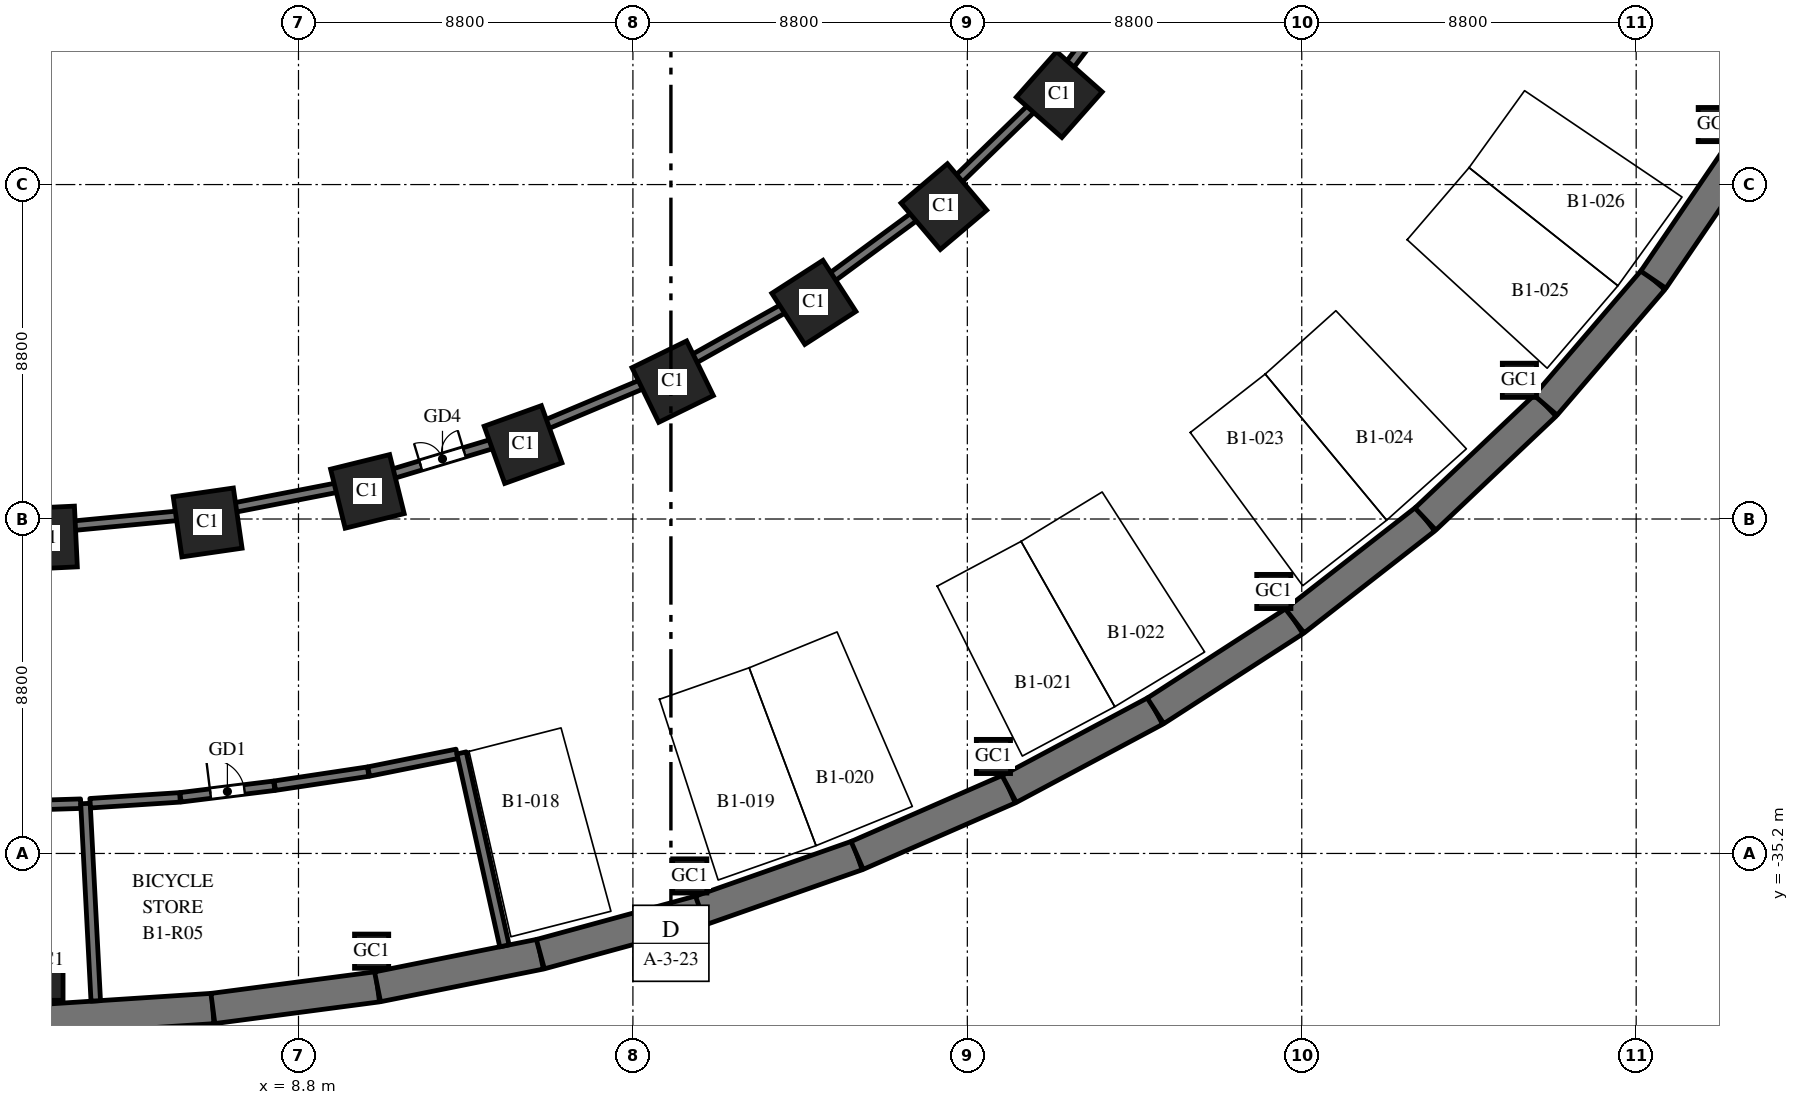
"""IFC4 building model, lengths in metres.
Left out: names, types, materials, properties, quantities, classifications, styles, units other than length and angle.
Written with IfcOpenShell. Run it as: python <this file> out.ifc"""

import sys

from ifc_helpers import new_model, si_unit, direction, frame, frame_2d, origin, origin_2d, place, context, subcontext, project, spatial, rectangle, hollow_rectangle, extrude, element, fill, save


model = new_model("IFC4")
c1 = context("Model", 3, precision=1e-05, world=origin(), true_north=direction((0.0, 1.0)))
c2 = subcontext(c1, "Body", "Model", "MODEL_VIEW")
j1 = project(units=[si_unit("LENGTHUNIT", "METRE"), si_unit("PLANEANGLEUNIT", "RADIAN")], contexts=[c1])
p1 = place(None, origin())
s1 = spatial("IfcSite", under=j1, at=p1, CompositionType="ELEMENT")
p2 = place(p1, origin())
s2 = spatial("IfcBuilding", under=s1, at=p2, CompositionType="ELEMENT")
p3 = place(p2, frame((0.0, 0.0, -4.2)))
s3 = spatial("IfcBuildingStorey", under=s2, at=p3, CompositionType="ELEMENT", Elevation=-4.2)
p4 = place(p3, frame((2.186, -39.564, 0.0), z_axis=(0.0, 0.0, 1.0), x_axis=(0.997876871627, 0.065128711577, 0.0)))
e1 = element("IfcWall", 1, at=p4, inside=s3, PredefinedType="SOLIDWALL", context=c2, shape_type="SweptSolid", body=[
    extrude(rectangle(XDim=4.371, YDim=0.8, at=frame_2d((2.186, 0.0))), origin(), (0.0, 0.0, 1.0), 3.85),
])
p5 = place(p3, frame((6.547, -39.28, 0.0), z_axis=(0.0, 0.0, 1.0), x_axis=(0.991441741932, 0.130549884544, 0.0)))
e2 = element("IfcWall", 2, at=p5, inside=s3, PredefinedType="SOLIDWALL", context=c2, shape_type="SweptSolid", body=[
    extrude(rectangle(XDim=4.37, YDim=0.8, at=frame_2d((2.185, 0.0))), origin(), (0.0, 0.0, 1.0), 3.85),
])
p6 = place(p3, frame((10.88, -38.709, 0.0), z_axis=(0.0, 0.0, 1.0), x_axis=(0.980494629762, 0.196545875071, 0.0)))
e3 = element("IfcWall", 3, at=p6, inside=s3, PredefinedType="SOLIDWALL", context=c2, shape_type="SweptSolid", body=[
    extrude(rectangle(XDim=4.37, YDim=0.8, at=frame_2d((2.185, 0.0))), origin(), (0.0, 0.0, 1.0), 3.85),
])
p7 = place(p3, frame((15.165, -37.85, 0.0), z_axis=(0.0, 0.0, 1.0), x_axis=(0.964679950239, 0.263424739931, 0.0)))
e4 = element("IfcWall", 4, at=p7, inside=s3, PredefinedType="SOLIDWALL", context=c2, shape_type="SweptSolid", body=[
    extrude(rectangle(XDim=4.369, YDim=0.8, at=frame_2d((2.185, 0.0))), origin(), (0.0, 0.0, 1.0), 3.85),
])
p8 = place(p3, frame((19.379, -36.699, 0.0), z_axis=(0.0, 0.0, 1.0), x_axis=(0.943526738033, 0.331296384853, 0.0)))
e5 = element("IfcWall", 5, at=p8, inside=s3, PredefinedType="SOLIDWALL", context=c2, shape_type="SweptSolid", body=[
    extrude(rectangle(XDim=4.368, YDim=0.8, at=frame_2d((2.184, 0.0))), origin(), (0.0, 0.0, 1.0), 3.85),
])
p9 = place(p3, frame((23.5, -35.252, 0.0), z_axis=(0.0, 0.0, 1.0), x_axis=(0.916336904548, 0.400408138483, 0.0)))
e6 = element("IfcWall", 6, at=p9, inside=s3, PredefinedType="SOLIDWALL", context=c2, shape_type="SweptSolid", body=[
    extrude(rectangle(XDim=4.366, YDim=0.8, at=frame_2d((2.183, 0.0))), origin(), (0.0, 0.0, 1.0), 3.85),
])
p10 = place(p3, frame((27.501, -33.504, 0.0), z_axis=(0.0, 0.0, 1.0), x_axis=(0.882159305704, 0.47095112205, 0.0)))
e7 = element("IfcWall", 7, at=p10, inside=s3, PredefinedType="SOLIDWALL", context=c2, shape_type="SweptSolid", body=[
    extrude(rectangle(XDim=4.365, YDim=0.8, at=frame_2d((2.182, 0.0))), origin(), (0.0, 0.0, 1.0), 3.85),
])
p11 = place(p3, frame((31.352, -31.448, 0.0), z_axis=(0.0, 0.0, 1.0), x_axis=(0.840047348843, 0.542513088969, 0.0)))
e8 = element("IfcWall", 8, at=p11, inside=s3, PredefinedType="SOLIDWALL", context=c2, shape_type="SweptSolid", body=[
    extrude(rectangle(XDim=4.362, YDim=0.8, at=frame_2d((2.181, 0.0))), origin(), (0.0, 0.0, 1.0), 3.85),
])
p12 = place(p3, frame((35.016, -29.082, 0.0), z_axis=(0.0, 0.0, 1.0), x_axis=(0.788491985196, 0.615045030288, 0.0)))
e9 = element("IfcWall", 9, at=p12, inside=s3, PredefinedType="SOLIDWALL", context=c2, shape_type="SweptSolid", body=[
    extrude(rectangle(XDim=4.359, YDim=0.8, at=frame_2d((2.18, 0.0))), origin(), (0.0, 0.0, 1.0), 3.85),
])
p13 = place(p3, frame((38.453, -26.401, 0.0), z_axis=(0.0, 0.0, 1.0), x_axis=(0.72620446032, 0.687478786444, 0.0)))
e10 = element("IfcWall", 10, at=p13, inside=s3, PredefinedType="SOLIDWALL", context=c2, shape_type="SweptSolid", body=[
    extrude(rectangle(XDim=4.356, YDim=0.8, at=frame_2d((2.178, 0.0))), origin(), (0.0, 0.0, 1.0), 3.85),
])
p14 = place(p3, frame((41.617, -23.406, 0.0), z_axis=(0.0, 0.0, 1.0), x_axis=(0.651387059497, 0.758745608699, 0.0)))
e11 = element("IfcWall", 11, at=p14, inside=s3, PredefinedType="SOLIDWALL", context=c2, shape_type="SweptSolid", body=[
    extrude(rectangle(XDim=4.353, YDim=0.8, at=frame_2d((2.176, 0.0))), origin(), (0.0, 0.0, 1.0), 3.85),
])
p15 = place(p3, frame((44.452, -20.104, 0.0), z_axis=(0.0, 0.0, 1.0), x_axis=(0.562667738859, 0.82668314102, 0.0)))
e12 = element("IfcWall", 12, at=p15, inside=s3, PredefinedType="SOLIDWALL", context=c2, shape_type="SweptSolid", body=[
    extrude(rectangle(XDim=4.349, YDim=0.8, at=frame_2d((2.174, 0.0))), origin(), (0.0, 0.0, 1.0), 3.85),
])
for number, where, z_axis, x_axis in (
    (13, (2.143, -26.898, 0.0), (0.0, 0.0, 1.0), (0.999, 0.048, 0.0)),
    (14, (6.409, -26.491, 0.0), (0.0, 0.0, 1.0), (0.99, 0.143, 0.0)),
    (15, (10.613, -25.674, 0.0), (0.0, 0.0, 1.0), (0.971, 0.24, 0.0)),
    (16, (14.709, -24.441, 0.0), (0.0, 0.0, 1.0), (0.941, 0.338, 0.0)),
    (17, (18.646, -22.785, 0.0), (0.0, 0.0, 1.0), (0.898, 0.439, 0.0)),
    (18, (22.362, -20.7, 0.0), (0.0, 0.0, 1.0), (0.84, 0.542, 0.0)),
    (19, (25.783, -18.18, 0.0), (0.0, 0.0, 1.0), (0.763, 0.646, 0.0)),
    (20, (28.819, -15.23, 0.0), (0.0, 0.0, 1.0), (0.663, 0.749, 0.0)),
):
    element("IfcColumn", number, at=place(p3, frame(where, z_axis=z_axis, x_axis=x_axis)), inside=s3, PredefinedType="COLUMN", context=c2, shape_type="SweptSolid", body=[
        extrude(rectangle(XDim=1.6, YDim=1.6, at=origin_2d()), origin(), (0.0, 0.0, 1.0), 4.2),
    ])
for number, where, z_axis, x_axis in (
    (21, (2.155, -38.614, 0.0), (0.0, 0.0, 1.0), (1.0, 0.0, 0.0)),
    (22, (10.725, -37.771, 0.0), (0.0, 0.0, 1.0), (1.0, 0.0, 0.0)),
    (23, (19.097, -35.792, 0.0), (0.0, 0.0, 1.0), (1.0, 0.0, 0.0)),
    (24, (27.087, -32.648, 0.0), (0.0, 0.0, 1.0), (1.0, 0.0, 0.0)),
    (25, (34.465, -28.307, 0.0), (0.0, 0.0, 1.0), (1.0, 0.0, 0.0)),
    (26, (40.928, -22.75, 0.0), (0.0, 0.0, 1.0), (1.0, 0.0, 0.0)),
    (27, (46.081, -16.021, 0.0), (0.0, 0.0, 1.0), (1.0, 0.0, 0.0)),
):
    element("IfcColumn", number, at=place(p3, frame(where, z_axis=z_axis, x_axis=x_axis)), inside=s3, PredefinedType="COLUMN", context=c2, shape_type="SweptSolid", body=[
        extrude(hollow_rectangle(XDim=0.9, YDim=0.9, WallThickness=0.045, at=origin_2d()), origin(), (0.0, 0.0, 1.0), 4.2),
    ])
p16 = place(p3, frame((0.704, -33.964, 0.0), z_axis=(0.0, 0.0, 1.0), x_axis=(0.999514588935, 0.031154237368, 0.0)))
e28 = element("IfcWall", 28, at=p16, inside=s3, PredefinedType="SOLIDWALL", context=c2, shape_type="SweptSolid", body=[
    extrude(rectangle(XDim=2.367, YDim=0.25, at=frame_2d((1.183, 0.0))), origin(), (0.0, 0.0, 1.0), 2.85),
])
p17 = place(p3, frame((3.194, -33.886, 0.0), z_axis=(0.0, 0.0, 1.0), x_axis=(0.052068437351, -0.998643518895, 0.0)))
e29 = element("IfcWall", 29, at=p17, inside=s3, PredefinedType="SOLIDWALL", context=c2, shape_type="SweptSolid", body=[
    extrude(rectangle(XDim=5.2, YDim=0.25, at=frame_2d((2.6, 0.0))), origin(), (0.0, 0.0, 1.0), 3.25),
])
p18 = place(p3, frame((3.319, -33.878, 0.0), z_axis=(0.0, 0.0, 1.0), x_axis=(0.997874570946, 0.065163952143, 0.0)))
e30 = element("IfcWall", 30, at=p18, inside=s3, PredefinedType="SOLIDWALL", context=c2, shape_type="SweptSolid", body=[
    extrude(rectangle(XDim=2.368, YDim=0.25, at=frame_2d((1.184, 0.0))), origin(), (0.0, 0.0, 1.0), 3.85),
])
p19 = place(p3, frame((5.696, -33.723, 0.0), z_axis=(0.0, 0.0, 1.0), x_axis=(0.992470098736, 0.122487154901, 0.0)))
e31 = element("IfcWall", 31, at=p19, inside=s3, PredefinedType="SOLIDWALL", context=c2, shape_type="SweptSolid", body=[
    extrude(rectangle(XDim=2.486, YDim=0.25, at=frame_2d((1.243, 0.0))), origin(), (0.0, 0.0, 1.0), 3.85),
])
p20 = place(p19, frame((0.793, 0.0, 0.0)))
e32 = element("IfcOpeningElement", 32, at=p20, cuts=e31, PredefinedType="OPENING", context=c2, shape_type="SweptSolid", body=[
    extrude(rectangle(XDim=0.9, YDim=2.1, at=frame_2d((0.45, 1.05))), frame((0.0, 0.135, 0.0), z_axis=(0.0, -1.0, 0.0), x_axis=(1.0, 0.0, 0.0)), (0.0, 0.0, 1.0), 0.27),
])
p21 = place(p3, frame((8.177, -33.417, 0.0), z_axis=(0.0, 0.0, 1.0), x_axis=(0.988860556861, 0.148844882627, 0.0)))
e33 = element("IfcWall", 33, at=p21, inside=s3, PredefinedType="SOLIDWALL", context=c2, shape_type="SweptSolid", body=[
    extrude(rectangle(XDim=2.485, YDim=0.25, at=frame_2d((1.242, 0.0))), origin(), (0.0, 0.0, 1.0), 2.85),
])
p22 = place(p3, frame((10.647, -33.044, 0.0), z_axis=(0.0, 0.0, 1.0), x_axis=(0.980501286176, 0.196512665768, 0.0)))
e34 = element("IfcWall", 34, at=p22, inside=s3, PredefinedType="SOLIDWALL", context=c2, shape_type="SweptSolid", body=[
    extrude(rectangle(XDim=2.368, YDim=0.25, at=frame_2d((1.184, 0.0))), origin(), (0.0, 0.0, 1.0), 3.85),
])
p23 = place(p3, frame((13.092, -32.554, 0.0), z_axis=(0.0, 0.0, 1.0), x_axis=(0.216865830922, -0.976201419472, 0.0)))
e35 = element("IfcWall", 35, at=p23, inside=s3, PredefinedType="SOLIDWALL", context=c2, shape_type="SweptSolid", body=[
    extrude(rectangle(XDim=5.2, YDim=0.25, at=frame_2d((2.6, 0.0))), origin(), (0.0, 0.0, 1.0), 3.25),
])
p24 = place(p3, frame((2.14, -26.647, 0.0), z_axis=(0.0, 0.0, 1.0), x_axis=(0.995473208191, 0.09504257874, 0.0)))
e36 = element("IfcWall", 36, at=p24, inside=s3, PredefinedType="SOLIDWALL", context=c2, shape_type="SweptSolid", body=[
    extrude(rectangle(XDim=4.244, YDim=0.25, at=frame_2d((2.122, 0.0))), origin(), (0.0, 0.0, 1.0), 2.95),
])
p25 = place(p3, frame((6.382, -26.241, 0.0), z_axis=(0.0, 0.0, 1.0), x_axis=(0.981622881166, 0.190831127365, 0.0)))
e37 = element("IfcWall", 37, at=p25, inside=s3, PredefinedType="SOLIDWALL", context=c2, shape_type="SweptSolid", body=[
    extrude(rectangle(XDim=4.24, YDim=0.25, at=frame_2d((2.12, 0.0))), origin(), (0.0, 0.0, 1.0), 2.95),
])
p26 = place(p3, frame((10.562, -25.428, 0.0), z_axis=(0.0, 0.0, 1.0), x_axis=(0.957589494621, 0.28813600919, 0.0)))
e38 = element("IfcWall", 38, at=p26, inside=s3, PredefinedType="SOLIDWALL", context=c2, shape_type="SweptSolid", body=[
    extrude(rectangle(XDim=4.234, YDim=0.25, at=frame_2d((2.117, 0.0))), origin(), (0.0, 0.0, 1.0), 2.95),
])
p27 = place(p26, frame((1.517, 0.0, 0.0)))
e39 = element("IfcOpeningElement", 39, at=p27, cuts=e38, PredefinedType="OPENING", context=c2, shape_type="SweptSolid", body=[
    extrude(rectangle(XDim=1.2, YDim=2.1, at=frame_2d((0.6, 1.05))), frame((0.0, 0.135, 0.0), z_axis=(0.0, -1.0, 0.0), x_axis=(1.0, 0.0, 0.0)), (0.0, 0.0, 1.0), 0.27),
])
p28 = place(p3, frame((14.633, -24.202, 0.0), z_axis=(0.0, 0.0, 1.0), x_axis=(0.921810386469, 0.387641085798, 0.0)))
e40 = element("IfcWall", 40, at=p28, inside=s3, PredefinedType="SOLIDWALL", context=c2, shape_type="SweptSolid", body=[
    extrude(rectangle(XDim=4.225, YDim=0.25, at=frame_2d((2.113, 0.0))), origin(), (0.0, 0.0, 1.0), 2.95),
])
p29 = place(p3, frame((18.544, -22.556, 0.0), z_axis=(0.0, 0.0, 1.0), x_axis=(0.872061015455, 0.489397165218, 0.0)))
e41 = element("IfcWall", 41, at=p29, inside=s3, PredefinedType="SOLIDWALL", context=c2, shape_type="SweptSolid", body=[
    extrude(rectangle(XDim=4.213, YDim=0.25, at=frame_2d((2.107, 0.0))), origin(), (0.0, 0.0, 1.0), 2.95),
])
p30 = place(p3, frame((22.233, -20.484, 0.0), z_axis=(0.0, 0.0, 1.0), x_axis=(0.805155221937, 0.593064135306, 0.0)))
e42 = element("IfcWall", 42, at=p30, inside=s3, PredefinedType="SOLIDWALL", context=c2, shape_type="SweptSolid", body=[
    extrude(rectangle(XDim=4.198, YDim=0.25, at=frame_2d((2.099, 0.0))), origin(), (0.0, 0.0, 1.0), 2.95),
])
p31 = place(p3, frame((25.627, -17.983, 0.0), z_axis=(0.0, 0.0, 1.0), x_axis=(0.717227656803, 0.696838925661, 0.0)))
e43 = element("IfcWall", 43, at=p31, inside=s3, PredefinedType="SOLIDWALL", context=c2, shape_type="SweptSolid", body=[
    extrude(rectangle(XDim=4.179, YDim=0.25, at=frame_2d((2.089, 0.0))), origin(), (0.0, 0.0, 1.0), 2.95),
])
p32 = place(p3, frame((28.636, -15.057, 0.0), z_axis=(0.0, 0.0, 1.0), x_axis=(0.604041965907, 0.796952510143, 0.0)))
e44 = element("IfcWall", 44, at=p32, inside=s3, PredefinedType="SOLIDWALL", context=c2, shape_type="SweptSolid", body=[
    extrude(rectangle(XDim=4.157, YDim=0.25, at=frame_2d((2.079, 0.0))), origin(), (0.0, 0.0, 1.0), 2.95),
])
p33 = place(p20, origin())
e45 = element("IfcDoor", 45, at=p33, inside=s3, OperationType="SINGLE_SWING_LEFT", PredefinedType="DOOR", context=c2, shape_type="SweptSolid", body=[
    extrude(rectangle(XDim=0.9, YDim=2.1, at=frame_2d((0.45, 1.05))), frame((0.0, 0.025, 0.0), z_axis=(0.0, -1.0, 0.0), x_axis=(1.0, 0.0, 0.0)), (0.0, 0.0, 1.0), 0.05),
])
fill(e32, e45)
p34 = place(p27, origin())
e46 = element("IfcDoor", 46, at=p34, inside=s3, OperationType="DOUBLE_DOOR_SINGLE_SWING", PredefinedType="DOOR", context=c2, shape_type="SweptSolid", body=[
    extrude(rectangle(XDim=1.2, YDim=2.1, at=frame_2d((0.6, 1.05))), frame((0.0, 0.025, 0.0), z_axis=(0.0, -1.0, 0.0), x_axis=(1.0, 0.0, 0.0)), (0.0, 0.0, 1.0), 0.05),
])
fill(e39, e46)
save(model, sys.argv[1])
